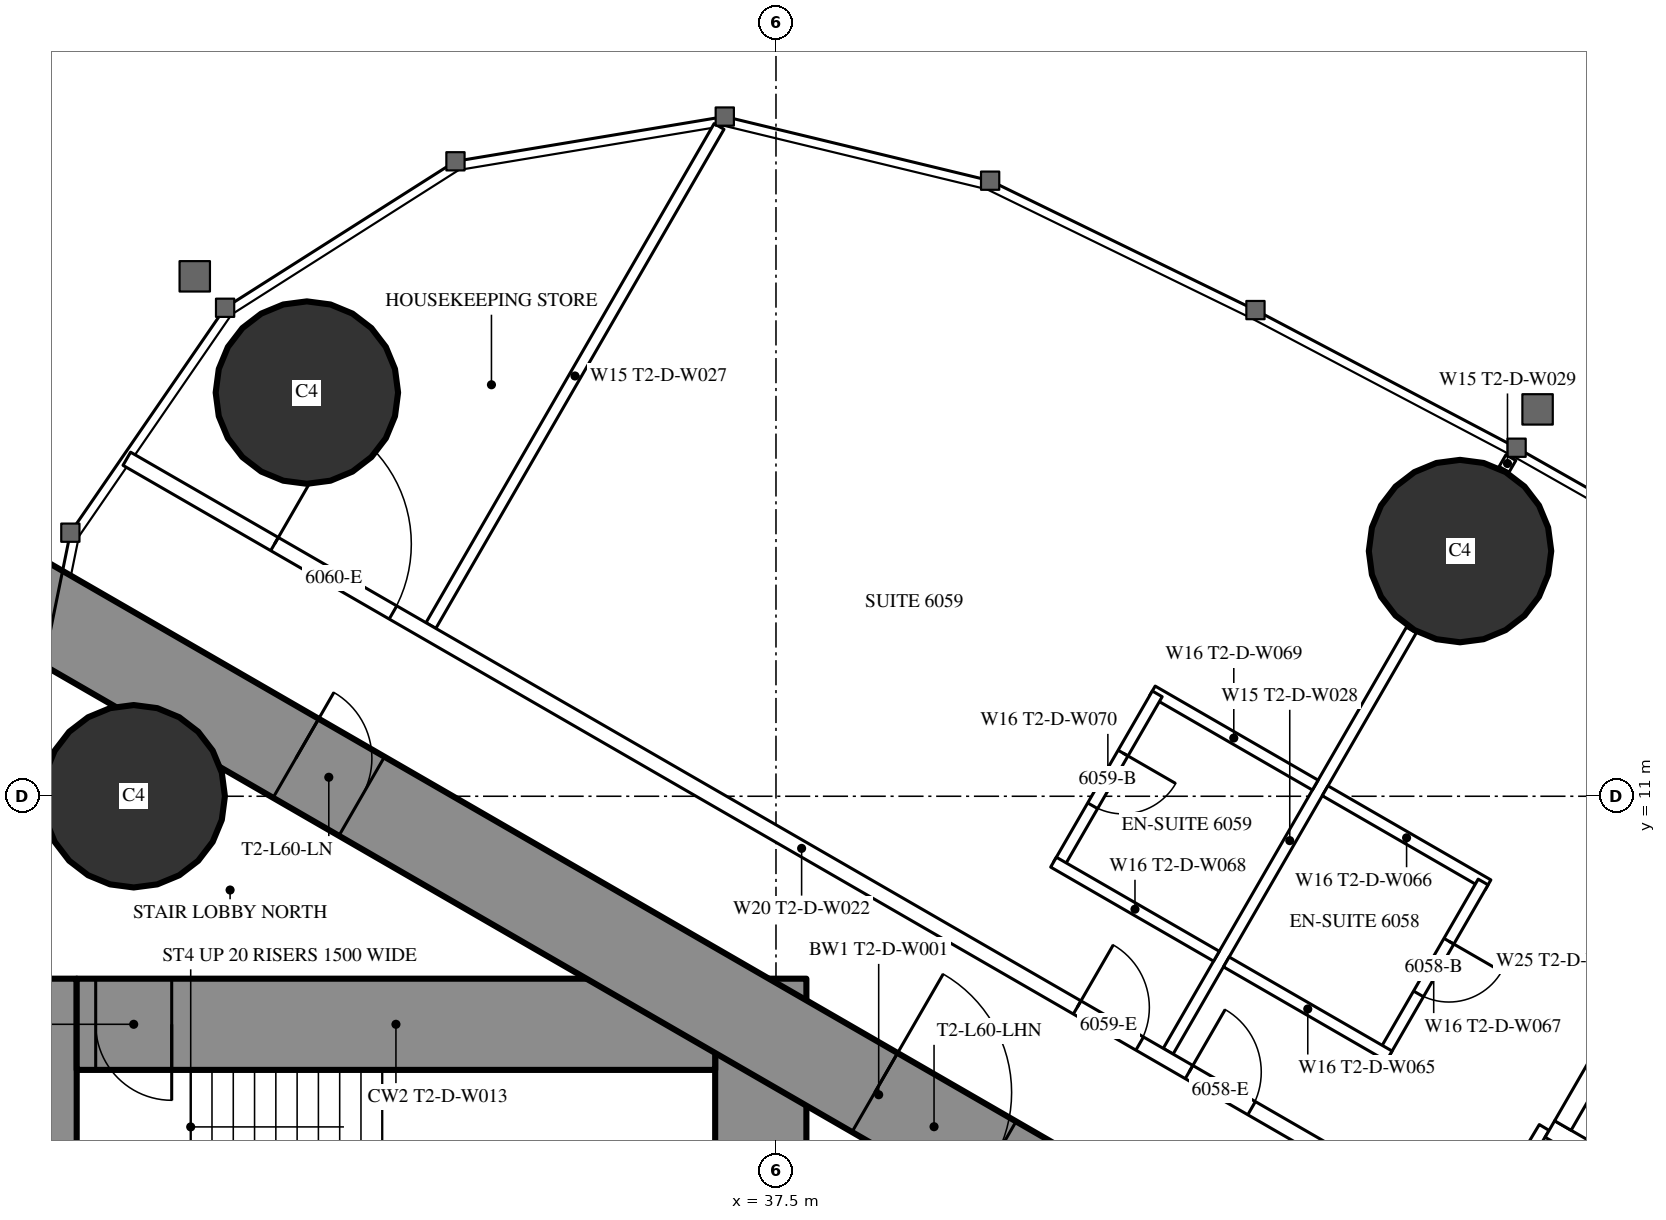
"""IFC4 building model, lengths in metres.
Left out: names, types, materials, properties, quantities, classifications, styles, units other than length and angle.
Written with IfcOpenShell. Run it as: python <this file> out.ifc"""

import sys

from ifc_helpers import new_model, si_unit, direction, frame, frame_2d, origin, origin_2d, place, context, subcontext, project, spatial, rectangle, circle, extrude, element, fill, save


model = new_model("IFC4")
c1 = context("Model", 3, precision=1e-05, world=origin(), true_north=direction((0.0, 1.0)))
c2 = subcontext(c1, "Body", "Model", "MODEL_VIEW")
j1 = project(units=[si_unit("LENGTHUNIT", "METRE"), si_unit("PLANEANGLEUNIT", "RADIAN")], contexts=[c1])
p1 = place(None, origin())
s1 = spatial("IfcSite", under=j1, at=p1, CompositionType="ELEMENT")
p2 = place(p1, origin())
s2 = spatial("IfcBuilding", under=s1, at=p2, CompositionType="ELEMENT")
p3 = place(p2, frame((0.0, 0.0, 226.1)))
s3 = spatial("IfcBuildingStorey", under=s2, at=p3, CompositionType="ELEMENT", Elevation=226.1)
for number, where, z_axis, x_axis in (
    (1, (31.328, 16.311, 0.0), (0.0, 0.0, 1.0), (1.0, 0.0, 0.0)),
    (2, (29.05, 11.0, 0.0), (0.0, 0.0, 1.0), (1.0, 0.0, 0.0)),
    (3, (46.499, 14.226, 0.0), (0.0, 0.0, 1.0), (1.0, 0.0, 0.0)),
):
    element("IfcColumn", number, at=place(p3, frame(where, z_axis=z_axis, x_axis=x_axis)), inside=s3, PredefinedType="COLUMN", context=c2, shape_type="SweptSolid", body=[
        extrude(circle(Radius=1.2, at=origin_2d()), origin(), (0.0, 0.0, 1.0), 3.6),
    ])
p4 = place(p3, frame((27.9, -8.6, 0.0), z_axis=(0.0, 0.0, 1.0), x_axis=(0.0, 1.0, 0.0)))
e4 = element("IfcWall", 4, at=p4, inside=s3, PredefinedType="SHEAR", context=c2, shape_type="SweptSolid", body=[
    extrude(rectangle(XDim=17.2, YDim=0.8, at=frame_2d((8.6, 0.0))), origin(), (0.0, 0.0, 1.0), 3.6),
])
p5 = place(p4, frame((9.35, 0.0, 0.0)))
e5 = element("IfcOpeningElement", 5, at=p5, cuts=e4, PredefinedType="OPENING", context=c2, shape_type="SweptSolid", body=[
    extrude(rectangle(XDim=0.9, YDim=2.2, at=frame_2d((0.45, 1.1))), frame((0.0, 0.41, 0.0), z_axis=(0.0, -1.0, 0.0), x_axis=(1.0, 0.0, 0.0)), (0.0, 0.0, 1.0), 0.82),
])
p6 = place(p3, frame((37.3, -8.6, 0.0), z_axis=(0.0, 0.0, 1.0), x_axis=(0.0, 1.0, 0.0)))
e6 = element("IfcWall", 6, at=p6, inside=s3, PredefinedType="SHEAR", context=c2, shape_type="SweptSolid", body=[
    extrude(rectangle(XDim=17.2, YDim=1.2, at=frame_2d((8.6, 0.0))), origin(), (0.0, 0.0, 1.0), 3.6),
])
p7 = place(p6, frame((7.7, 0.0, 0.0)))
e7 = element("IfcOpeningElement", 7, at=p7, cuts=e6, PredefinedType="OPENING", context=c2, shape_type="SweptSolid", body=[
    extrude(rectangle(XDim=1.8, YDim=2.2, at=frame_2d((0.9, 1.1))), frame((0.0, 0.61, 0.0), z_axis=(0.0, -1.0, 0.0), x_axis=(1.0, 0.0, 0.0)), (0.0, 0.0, 1.0), 1.22),
])
p8 = place(p3, frame((28.3, 8.0, 0.0), z_axis=(0.0, 0.0, 1.0), x_axis=(1.0, 0.0, 0.0)))
e8 = element("IfcWall", 8, at=p8, inside=s3, PredefinedType="SHEAR", context=c2, shape_type="SweptSolid", body=[
    extrude(rectangle(XDim=8.4, YDim=1.2, at=frame_2d((4.2, 0.0))), origin(), (0.0, 0.0, 1.0), 3.6),
])
p9 = place(p8, frame((0.25, 0.0, 0.0)))
e9 = element("IfcOpeningElement", 9, at=p9, cuts=e8, PredefinedType="OPENING", context=c2, shape_type="SweptSolid", body=[
    extrude(rectangle(XDim=1.0, YDim=2.2, at=frame_2d((0.5, 1.1))), frame((0.0, 0.61, 0.0), z_axis=(0.0, -1.0, 0.0), x_axis=(1.0, 0.0, 0.0)), (0.0, 0.0, 1.0), 1.22),
])
p10 = place(p3, frame((27.2, 13.8, 0.0), z_axis=(0.0, 0.0, 1.0), x_axis=(0.866024515034, -0.500001539357, 0.0)))
e10 = element("IfcWall", 10, at=p10, inside=s3, PredefinedType="SHEAR", context=c2, shape_type="SweptSolid", body=[
    extrude(rectangle(XDim=26.907, YDim=1.2, at=frame_2d((13.454, 0.0))), origin(), (0.0, 0.0, 1.0), 3.6),
])
p11 = place(p10, frame((4.6, 0.0, 0.0)))
e11 = element("IfcOpeningElement", 11, at=p11, cuts=e10, PredefinedType="OPENING", context=c2, shape_type="SweptSolid", body=[
    extrude(rectangle(XDim=1.0, YDim=2.2, at=frame_2d((0.5, 1.1))), frame((0.0, 0.61, 0.0), z_axis=(0.0, -1.0, 0.0), x_axis=(1.0, 0.0, 0.0)), (0.0, 0.0, 1.0), 1.22),
])
p12 = place(p10, frame((13.395, 0.0, 0.0)))
e12 = element("IfcOpeningElement", 12, at=p12, cuts=e10, PredefinedType="OPENING", context=c2, shape_type="SweptSolid", body=[
    extrude(rectangle(XDim=1.8, YDim=2.2, at=frame_2d((0.9, 1.1))), frame((0.0, 0.61, 0.0), z_axis=(0.0, -1.0, 0.0), x_axis=(1.0, 0.0, 0.0)), (0.0, 0.0, 1.0), 1.22),
])
p13 = place(p3, frame((32.96, 13.246, 0.0), z_axis=(0.0, 0.0, 1.0), x_axis=(0.500000236886, 0.866025267018, 0.0)))
e13 = element("IfcWall", 13, at=p13, inside=s3, PredefinedType="PARTITIONING", context=c2, shape_type="SweptSolid", body=[
    extrude(rectangle(XDim=7.583, YDim=0.15, at=frame_2d((3.791, 0.0))), origin(), (0.0, 0.0, 1.0), 3.35),
])
p14 = place(p3, frame((42.66, 7.646, 0.0), z_axis=(0.0, 0.0, 1.0), x_axis=(0.499996592859, 0.866027370889, 0.0)))
e14 = element("IfcWall", 14, at=p14, inside=s3, PredefinedType="PARTITIONING", context=c2, shape_type="SweptSolid", body=[
    extrude(rectangle(XDim=6.398, YDim=0.15, at=frame_2d((3.199, 0.0))), origin(), (0.0, 0.0, 1.0), 2.45),
])
p15 = place(p3, frame((47.079, 15.3, 0.0), z_axis=(0.0, 0.0, 1.0), x_axis=(0.499212083968, 0.866479829667, 0.0)))
e15 = element("IfcWall", 15, at=p15, inside=s3, PredefinedType="PARTITIONING", context=c2, shape_type="SweptSolid", body=[
    extrude(rectangle(XDim=0.179, YDim=0.15, at=frame_2d((0.09, 0.0))), origin(), (0.0, 0.0, 1.0), 2.45),
])
p16 = place(p3, frame((28.959, 15.44, 0.0), z_axis=(0.0, 0.0, 1.0), x_axis=(0.866028936079, -0.499993881836, 0.0)))
e16 = element("IfcWall", 16, at=p16, inside=s3, PredefinedType="PARTITIONING", context=c2, shape_type="SweptSolid", body=[
    extrude(rectangle(XDim=20.503, YDim=0.2, at=frame_2d((10.251, 0.0))), origin(), (0.0, 0.0, 1.0), 3.35),
])
p17 = place(p16, frame((16.137, 0.0, 0.0)))
e17 = element("IfcOpeningElement", 17, at=p17, cuts=e16, PredefinedType="OPENING", context=c2, shape_type="SweptSolid", body=[
    extrude(rectangle(XDim=0.95, YDim=2.2, at=frame_2d((0.475, 1.1))), frame((0.0, 0.11, 0.0), z_axis=(0.0, -1.0, 0.0), x_axis=(1.0, 0.0, 0.0)), (0.0, 0.0, 1.0), 0.22),
])
p18 = place(p16, frame((14.437, 0.0, 0.0)))
e18 = element("IfcOpeningElement", 18, at=p18, cuts=e16, PredefinedType="OPENING", context=c2, shape_type="SweptSolid", body=[
    extrude(rectangle(XDim=0.95, YDim=2.2, at=frame_2d((0.475, 1.1))), frame((0.0, 0.11, 0.0), z_axis=(0.0, -1.0, 0.0), x_axis=(1.0, 0.0, 0.0)), (0.0, 0.0, 1.0), 0.22),
])
p19 = place(p16, frame((2.244, 0.0, 0.0)))
e19 = element("IfcOpeningElement", 19, at=p19, cuts=e16, PredefinedType="OPENING", context=c2, shape_type="SweptSolid", body=[
    extrude(rectangle(XDim=1.8, YDim=2.04, at=frame_2d((0.9, 1.02))), frame((0.0, 0.11, 0.0), z_axis=(0.0, -1.0, 0.0), x_axis=(1.0, 0.0, 0.0)), (0.0, 0.0, 1.0), 0.22),
])
p20 = place(p3, frame((47.606, 6.642, 0.0), z_axis=(0.0, 0.0, 1.0), x_axis=(-0.51353662755, -0.858067673418, 0.0)))
e20 = element("IfcWall", 20, at=p20, inside=s3, PredefinedType="PARTITIONING", context=c2, shape_type="SweptSolid", body=[
    extrude(rectangle(XDim=1.91, YDim=0.15, at=frame_2d((0.955, 0.0))), origin(), (0.0, 0.0, 1.0), 3.35),
])
p21 = place(p3, frame((44.725, 11.072, 0.0), z_axis=(0.0, 0.0, 1.0), x_axis=(0.866006523861, -0.500032699561, 0.0)))
e21 = element("IfcWall", 21, at=p21, inside=s3, PredefinedType="PARTITIONING", context=c2, shape_type="SweptSolid", body=[
    extrude(rectangle(XDim=2.475, YDim=0.15, at=frame_2d((1.237, 0.0))), origin(), (0.0, 0.0, 1.0), 3.35),
])
p22 = place(p3, frame((45.503, 7.621, 0.0), z_axis=(0.0, 0.0, 1.0), x_axis=(0.500006934395, 0.866021400173, 0.0)))
e22 = element("IfcWall", 22, at=p22, inside=s3, PredefinedType="PARTITIONING", context=c2, shape_type="SweptSolid", body=[
    extrude(rectangle(XDim=2.6, YDim=0.15, at=frame_2d((1.3, 0.0))), origin(), (0.0, 0.0, 1.0), 3.35),
])
p23 = place(p22, frame((0.9, 0.0, 0.0)))
e23 = element("IfcOpeningElement", 23, at=p23, cuts=e22, PredefinedType="OPENING", context=c2, shape_type="SweptSolid", body=[
    extrude(rectangle(XDim=0.8, YDim=2.2, at=frame_2d((0.4, 1.1))), frame((0.0, 0.085, 0.0), z_axis=(0.0, -1.0, 0.0), x_axis=(1.0, 0.0, 0.0)), (0.0, 0.0, 1.0), 0.17),
])
p24 = place(p3, frame((43.425, 8.821, 0.0), z_axis=(0.0, 0.0, 1.0), x_axis=(0.866006523861, -0.500032699561, 0.0)))
e24 = element("IfcWall", 24, at=p24, inside=s3, PredefinedType="PARTITIONING", context=c2, shape_type="SweptSolid", body=[
    extrude(rectangle(XDim=2.475, YDim=0.15, at=frame_2d((1.237, 0.0))), origin(), (0.0, 0.0, 1.0), 2.5),
])
p25 = place(p3, frame((42.451, 12.385, 0.0), z_axis=(0.0, 0.0, 1.0), x_axis=(0.866031185235, -0.4999899861, 0.0)))
e25 = element("IfcWall", 25, at=p25, inside=s3, PredefinedType="PARTITIONING", context=c2, shape_type="SweptSolid", body=[
    extrude(rectangle(XDim=2.475, YDim=0.15, at=frame_2d((1.238, 0.0))), origin(), (0.0, 0.0, 1.0), 3.35),
])
p26 = place(p3, frame((41.216, 10.095, 0.0), z_axis=(0.0, 0.0, 1.0), x_axis=(0.499936506574, 0.866062058628, 0.0)))
e26 = element("IfcWall", 26, at=p26, inside=s3, PredefinedType="PARTITIONING", context=c2, shape_type="SweptSolid", body=[
    extrude(rectangle(XDim=2.6, YDim=0.15, at=frame_2d((1.3, 0.0))), origin(), (0.0, 0.0, 1.0), 3.35),
])
p27 = place(p26, frame((0.9, 0.0, 0.0)))
e27 = element("IfcOpeningElement", 27, at=p27, cuts=e26, PredefinedType="OPENING", context=c2, shape_type="SweptSolid", body=[
    extrude(rectangle(XDim=0.8, YDim=2.2, at=frame_2d((0.4, 1.1))), frame((0.0, 0.085, 0.0), z_axis=(0.0, -1.0, 0.0), x_axis=(1.0, 0.0, 0.0)), (0.0, 0.0, 1.0), 0.17),
])
p28 = place(p3, frame((41.151, 10.133, 0.0), z_axis=(0.0, 0.0, 1.0), x_axis=(0.866006523861, -0.500032699561, 0.0)))
e28 = element("IfcWall", 28, at=p28, inside=s3, PredefinedType="PARTITIONING", context=c2, shape_type="SweptSolid", body=[
    extrude(rectangle(XDim=2.475, YDim=0.15, at=frame_2d((1.237, 0.0))), origin(), (0.0, 0.0, 1.0), 2.5),
])
p29 = place(p3, frame((47.681, 6.622, 0.0), z_axis=(0.0, 0.0, 1.0), x_axis=(0.86603344179, -0.499986077507, 0.0)))
e29 = element("IfcWall", 29, at=p29, inside=s3, PredefinedType="PARTITIONING", context=c2, shape_type="SweptSolid", body=[
    extrude(rectangle(XDim=6.6, YDim=0.25, at=frame_2d((3.3, 0.0))), origin(), (0.0, 0.0, 1.0), 3.35),
])
p30 = place(p29, frame((0.75, 0.0, 0.0)))
e30 = element("IfcOpeningElement", 30, at=p30, cuts=e29, PredefinedType="OPENING", context=c2, shape_type="SweptSolid", body=[
    extrude(rectangle(XDim=1.1, YDim=2.2, at=frame_2d((0.55, 1.1))), frame((0.0, 0.135, 0.0), z_axis=(0.0, -1.0, 0.0), x_axis=(1.0, 0.0, 0.0)), (0.0, 0.0, 1.0), 0.27),
])
p31 = place(p29, frame((2.75, 0.0, 0.0)))
e31 = element("IfcOpeningElement", 31, at=p31, cuts=e29, PredefinedType="OPENING", context=c2, shape_type="SweptSolid", body=[
    extrude(rectangle(XDim=1.1, YDim=2.2, at=frame_2d((0.55, 1.1))), frame((0.0, 0.135, 0.0), z_axis=(0.0, -1.0, 0.0), x_axis=(1.0, 0.0, 0.0)), (0.0, 0.0, 1.0), 0.27),
])
p32 = place(p29, frame((4.75, 0.0, 0.0)))
e32 = element("IfcOpeningElement", 32, at=p32, cuts=e29, PredefinedType="OPENING", context=c2, shape_type="SweptSolid", body=[
    extrude(rectangle(XDim=1.1, YDim=2.2, at=frame_2d((0.55, 1.1))), frame((0.0, 0.135, 0.0), z_axis=(0.0, -1.0, 0.0), x_axis=(1.0, 0.0, 0.0)), (0.0, 0.0, 1.0), 0.27),
])
p33 = place(p3, frame((47.852, 6.668, 0.0), z_axis=(0.0, 0.0, 1.0), x_axis=(0.499929347863, 0.866066190972, 0.0)))
e33 = element("IfcWall", 33, at=p33, inside=s3, PredefinedType="PARTITIONING", context=c2, shape_type="SweptSolid", body=[
    extrude(rectangle(XDim=3.201, YDim=0.25, at=frame_2d((1.6, 0.0))), origin(), (0.0, 0.0, 1.0), 3.35),
])
p34 = place(p23, origin())
e34 = element("IfcDoor", 34, at=p34, inside=s3, OperationType="SINGLE_SWING_RIGHT", PredefinedType="DOOR", context=c2, shape_type="SweptSolid", body=[
    extrude(rectangle(XDim=0.8, YDim=2.2, at=frame_2d((0.4, 1.1))), frame((0.0, 0.025, 0.0), z_axis=(0.0, -1.0, 0.0), x_axis=(1.0, 0.0, 0.0)), (0.0, 0.0, 1.0), 0.05),
])
fill(e23, e34)
p35 = place(p17, origin())
e35 = element("IfcDoor", 35, at=p35, inside=s3, OperationType="SINGLE_SWING_LEFT", PredefinedType="DOOR", context=c2, shape_type="SweptSolid", body=[
    extrude(rectangle(XDim=0.95, YDim=2.2, at=frame_2d((0.475, 1.1))), frame((0.0, 0.025, 0.0), z_axis=(0.0, -1.0, 0.0), x_axis=(1.0, 0.0, 0.0)), (0.0, 0.0, 1.0), 0.05),
])
fill(e17, e35)
p36 = place(p27, origin())
e36 = element("IfcDoor", 36, at=p36, inside=s3, OperationType="SINGLE_SWING_RIGHT", PredefinedType="DOOR", context=c2, shape_type="SweptSolid", body=[
    extrude(rectangle(XDim=0.8, YDim=2.2, at=frame_2d((0.4, 1.1))), frame((0.0, 0.025, 0.0), z_axis=(0.0, -1.0, 0.0), x_axis=(1.0, 0.0, 0.0)), (0.0, 0.0, 1.0), 0.05),
])
fill(e27, e36)
p37 = place(p18, origin())
e37 = element("IfcDoor", 37, at=p37, inside=s3, OperationType="SINGLE_SWING_LEFT", PredefinedType="DOOR", context=c2, shape_type="SweptSolid", body=[
    extrude(rectangle(XDim=0.95, YDim=2.2, at=frame_2d((0.475, 1.1))), frame((0.0, 0.025, 0.0), z_axis=(0.0, -1.0, 0.0), x_axis=(1.0, 0.0, 0.0)), (0.0, 0.0, 1.0), 0.05),
])
fill(e18, e37)
p38 = place(p19, origin())
e38 = element("IfcDoor", 38, at=p38, inside=s3, OperationType="DOUBLE_DOOR_SINGLE_SWING", PredefinedType="DOOR", context=c2, shape_type="SweptSolid", body=[
    extrude(rectangle(XDim=1.8, YDim=2.04, at=frame_2d((0.9, 1.02))), frame((0.0, 0.025, 0.0), z_axis=(0.0, -1.0, 0.0), x_axis=(1.0, 0.0, 0.0)), (0.0, 0.0, 1.0), 0.05),
])
fill(e19, e38)
p39 = place(p11, origin())
e39 = element("IfcDoor", 39, at=p39, inside=s3, OperationType="SINGLE_SWING_LEFT", PredefinedType="DOOR", context=c2, shape_type="SweptSolid", body=[
    extrude(rectangle(XDim=1.0, YDim=2.2, at=frame_2d((0.5, 1.1))), frame((0.0, 0.025, 0.0), z_axis=(0.0, -1.0, 0.0), x_axis=(1.0, 0.0, 0.0)), (0.0, 0.0, 1.0), 0.05),
])
fill(e11, e39)
p40 = place(p12, origin())
e40 = element("IfcDoor", 40, at=p40, inside=s3, OperationType="DOUBLE_DOOR_SINGLE_SWING", PredefinedType="DOOR", context=c2, shape_type="SweptSolid", body=[
    extrude(rectangle(XDim=1.8, YDim=2.2, at=frame_2d((0.9, 1.1))), frame((0.0, 0.025, 0.0), z_axis=(0.0, -1.0, 0.0), x_axis=(1.0, 0.0, 0.0)), (0.0, 0.0, 1.0), 0.05),
])
fill(e12, e40)
p41 = place(p9, origin())
e41 = element("IfcDoor", 41, at=p41, inside=s3, OperationType="SINGLE_SWING_RIGHT", PredefinedType="DOOR", context=c2, shape_type="SweptSolid", body=[
    extrude(rectangle(XDim=1.0, YDim=2.2, at=frame_2d((0.5, 1.1))), frame((0.0, 0.025, 0.0), z_axis=(0.0, -1.0, 0.0), x_axis=(1.0, 0.0, 0.0)), (0.0, 0.0, 1.0), 0.05),
])
fill(e9, e41)
save(model, sys.argv[1])
